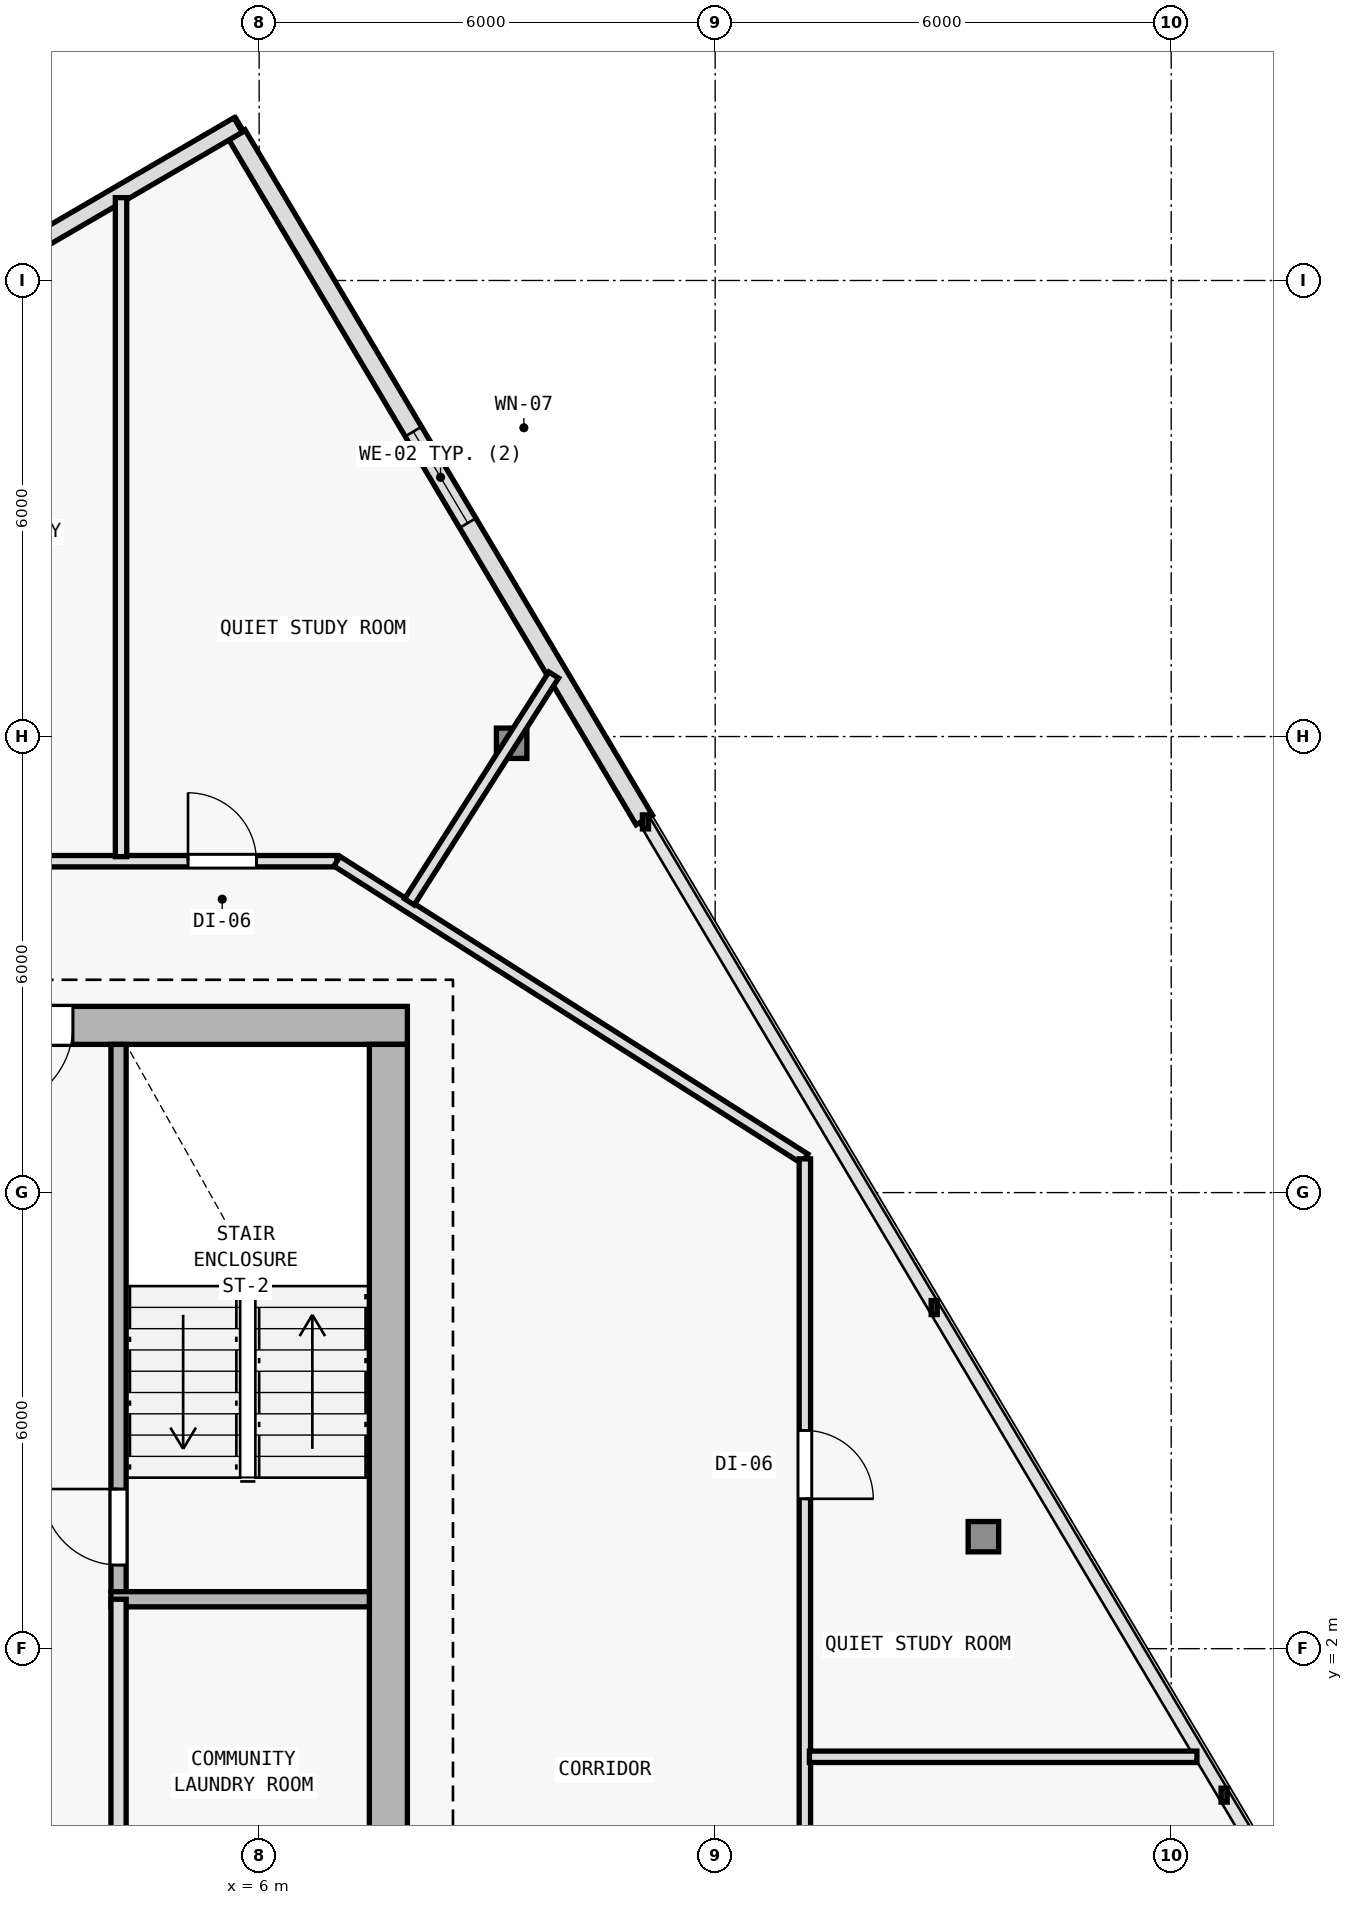
"""IFC4 building model, lengths in metres.
Left out: names, types, materials, properties, quantities, classifications, styles, units other than length and angle.
Written with IfcOpenShell. Run it as: python <this file> out.ifc"""

import sys

from ifc_helpers import new_model, si_unit, direction, frame, frame_2d, origin, origin_2d, place, context, subcontext, project, spatial, rectangle, i_section, extrude, element, fill, save


model = new_model("IFC4")
c1 = context("Model", 3, precision=1e-05, world=origin(), true_north=direction((0.0, 1.0)))
c2 = subcontext(c1, "Body", "Model", "MODEL_VIEW")
j1 = project(units=[si_unit("LENGTHUNIT", "METRE"), si_unit("PLANEANGLEUNIT", "RADIAN")], contexts=[c1])
p1 = place(None, origin())
s1 = spatial("IfcSite", under=j1, at=p1, CompositionType="ELEMENT")
p2 = place(p1, origin())
s2 = spatial("IfcBuilding", under=s1, at=p2, CompositionType="ELEMENT")
p3 = place(p2, frame((0.0, 0.0, 163.8)))
s3 = spatial("IfcBuildingStorey", under=s2, at=p3, CompositionType="ELEMENT", Elevation=163.8)
for number, where, z_axis, x_axis in (
    (1, (7.7, 10.2, 0.0), (0.0, 0.0, 1.0), (1.0, 0.0, 0.0)),
    (2, (7.7, 0.4, 0.0), (0.0, 0.0, 1.0), (1.0, 0.0, 0.0)),
):
    element("IfcColumn", number, at=place(p3, frame(where, z_axis=z_axis, x_axis=x_axis)), inside=s3, PredefinedType="COLUMN", context=c2, shape_type="SweptSolid", body=[
        extrude(i_section(OverallWidth=0.404, OverallDepth=0.407, WebThickness=0.017, FlangeThickness=0.028, FilletRadius=0.015, at=origin_2d()), origin(), (0.0, 0.0, 1.0), 3.6),
    ])
p4 = place(p3, frame((15.529, 3.473, 0.005), z_axis=(-0.018974023902, 0.009521015578, 0.999774642947), x_axis=(-0.44849454954, -0.893785566583, 0.0)))
e3 = element("IfcColumn", 3, at=p4, inside=s3, PredefinedType="COLUMN", context=c2, shape_type="SweptSolid", body=[
    extrude(i_section(OverallWidth=0.401, OverallDepth=0.399, WebThickness=0.016, FlangeThickness=0.025, FilletRadius=0.015, at=origin_2d()), origin(), (0.0, 0.0, 1.0), 3.59),
])
p5 = place(p3, frame((9.322, 13.912, 0.005), z_axis=(-0.011767054935, -0.002516653368, 0.999927598816), x_axis=(0.209143047003, -0.977885057607, 0.0)))
e4 = element("IfcColumn", 4, at=p5, inside=s3, PredefinedType="COLUMN", context=c2, shape_type="SweptSolid", body=[
    extrude(i_section(OverallWidth=0.401, OverallDepth=0.399, WebThickness=0.016, FlangeThickness=0.025, FilletRadius=0.015, at=origin_2d()), origin(), (0.0, 0.0, 1.0), 3.589),
])
p6 = place(p3, frame((5.706, 21.919, 0.0), z_axis=(0.0, 0.0, 1.0), x_axis=(0.511079110892, -0.859533677298, 0.0)))
e5 = element("IfcWall", 5, at=p6, inside=s3, PredefinedType="SOLIDWALL", context=c2, shape_type="SweptSolid", body=[
    extrude(rectangle(XDim=10.489, YDim=0.25, at=frame_2d((5.245, 0.0))), origin(), (0.0, 0.0, 1.0), 3.35),
])
p7 = place(p6, frame((4.545, 0.0, 0.62)))
e6 = element("IfcOpeningElement", 6, at=p7, cuts=e5, PredefinedType="OPENING", context=c2, shape_type="SweptSolid", body=[
    extrude(rectangle(XDim=1.4, YDim=2.0, at=frame_2d((0.7, 1.0))), frame((0.0, 0.135, 0.0), z_axis=(0.0, -1.0, 0.0), x_axis=(1.0, 0.0, 0.0)), (0.0, 0.0, 1.0), 0.27),
])
p8 = place(p3, frame((1.987, 19.868, 0.0), z_axis=(0.0, 0.0, 1.0), x_axis=(0.863979520686, 0.503526948469, 0.0)))
e7 = element("IfcWall", 7, at=p8, inside=s3, PredefinedType="SOLIDWALL", context=c2, shape_type="SweptSolid", body=[
    extrude(rectangle(XDim=4.324, YDim=0.22, at=frame_2d((2.162, 0.0))), origin(), (0.0, 0.0, 1.0), 3.35),
])
p9 = place(p3, frame((7.95, 10.2, 0.0), z_axis=(0.0, 0.0, 1.0), x_axis=(-1.0, 0.0, 0.0)))
e8 = element("IfcWall", 8, at=p9, inside=s3, PredefinedType="SHEAR", context=c2, shape_type="SweptSolid", body=[
    extrude(rectangle(XDim=15.9, YDim=0.5, at=frame_2d((7.95, 0.0))), origin(), (0.0, 0.0, 1.0), 3.35),
])
p10 = place(p9, frame((4.4, 0.0, 0.0)))
e9 = element("IfcOpeningElement", 9, at=p10, cuts=e8, PredefinedType="OPENING", context=c2, shape_type="SweptSolid", body=[
    extrude(rectangle(XDim=1.1, YDim=2.15, at=frame_2d((0.55, 1.075))), frame((0.0, 0.26, 0.0), z_axis=(0.0, -1.0, 0.0), x_axis=(1.0, 0.0, 0.0)), (0.0, 0.0, 1.0), 0.52),
])
p11 = place(p3, frame((7.7, 9.95, 0.0), z_axis=(0.0, 0.0, 1.0), x_axis=(0.0, -1.0, 0.0)))
e10 = element("IfcWall", 10, at=p11, inside=s3, PredefinedType="SHEAR", context=c2, shape_type="SweptSolid", body=[
    extrude(rectangle(XDim=19.1, YDim=0.5, at=frame_2d((9.55, 0.0))), origin(), (0.0, 0.0, 1.0), 3.35),
])
p12 = place(p3, frame((4.15, 2.75, 0.0), z_axis=(0.0, 0.0, 1.0), x_axis=(0.0, 1.0, 0.0)))
e11 = element("IfcWall", 11, at=p12, inside=s3, PredefinedType="SOLIDWALL", context=c2, shape_type="SweptSolid", body=[
    extrude(rectangle(XDim=7.2, YDim=0.2, at=frame_2d((3.6, 0.0))), origin(), (0.0, 0.0, 1.0), 3.35),
])
p13 = place(p12, frame((0.35, 0.0, 0.0)))
e12 = element("IfcOpeningElement", 12, at=p13, cuts=e11, PredefinedType="OPENING", context=c2, shape_type="SweptSolid", body=[
    extrude(rectangle(XDim=1.0, YDim=2.15, at=frame_2d((0.5, 1.075))), frame((0.0, 0.11, 0.0), z_axis=(0.0, -1.0, 0.0), x_axis=(1.0, 0.0, 0.0)), (0.0, 0.0, 1.0), 0.22),
])
p14 = place(p3, frame((4.05, 2.65, 0.0), z_axis=(0.0, 0.0, 1.0), x_axis=(1.0, 0.0, 0.0)))
e13 = element("IfcWall", 13, at=p14, inside=s3, PredefinedType="SOLIDWALL", context=c2, shape_type="SweptSolid", body=[
    extrude(rectangle(XDim=3.4, YDim=0.2, at=frame_2d((1.7, 0.0))), origin(), (0.0, 0.0, 1.0), 3.35),
])
p15 = place(p3, frame((4.15, -6.05, 0.0), z_axis=(0.0, 0.0, 1.0), x_axis=(0.0, 1.0, 0.0)))
e14 = element("IfcWall", 14, at=p15, inside=s3, PredefinedType="SOLIDWALL", context=c2, shape_type="SweptSolid", body=[
    extrude(rectangle(XDim=8.7, YDim=0.2, at=frame_2d((4.35, 0.0))), origin(), (0.0, 0.0, 1.0), 3.35),
])
p16 = place(p15, frame((3.6, 0.0, 0.0)))
e15 = element("IfcOpeningElement", 15, at=p16, cuts=e14, PredefinedType="OPENING", context=c2, shape_type="SweptSolid", body=[
    extrude(rectangle(XDim=0.95, YDim=2.1, at=frame_2d((0.475, 1.05))), frame((0.0, 0.11, 0.0), z_axis=(0.0, -1.0, 0.0), x_axis=(1.0, 0.0, 0.0)), (0.0, 0.0, 1.0), 0.22),
])
p17 = place(p3, frame((-7.041, 12.36, 0.0), z_axis=(0.0, 0.0, 1.0), x_axis=(1.0, 0.0, 0.0)))
e16 = element("IfcWall", 16, at=p17, inside=s3, PredefinedType="PARTITIONING", context=c2, shape_type="SweptSolid", body=[
    extrude(rectangle(XDim=14.064, YDim=0.15, at=frame_2d((7.032, 0.0))), origin(), (0.0, 0.0, 1.0), 2.965),
])
p18 = place(p17, frame((12.105, 0.0, 0.0)))
e17 = element("IfcOpeningElement", 17, at=p18, cuts=e16, PredefinedType="OPENING", context=c2, shape_type="SweptSolid", body=[
    extrude(rectangle(XDim=0.9, YDim=2.1, at=frame_2d((0.45, 1.05))), frame((0.0, 0.085, 0.0), z_axis=(0.0, -1.0, 0.0), x_axis=(1.0, 0.0, 0.0)), (0.0, 0.0, 1.0), 0.17),
])
p19 = place(p17, frame((9.137, 0.0, 0.0)))
e18 = element("IfcOpeningElement", 18, at=p19, cuts=e16, PredefinedType="OPENING", context=c2, shape_type="SweptSolid", body=[
    extrude(rectangle(XDim=0.9, YDim=2.1, at=frame_2d((0.45, 1.05))), frame((0.0, 0.085, 0.0), z_axis=(0.0, -1.0, 0.0), x_axis=(1.0, 0.0, 0.0)), (0.0, 0.0, 1.0), 0.17),
])
p20 = place(p17, frame((6.193, 0.0, 0.0)))
e19 = element("IfcOpeningElement", 19, at=p20, cuts=e16, PredefinedType="OPENING", context=c2, shape_type="SweptSolid", body=[
    extrude(rectangle(XDim=0.9, YDim=2.1, at=frame_2d((0.45, 1.05))), frame((0.0, 0.085, 0.0), z_axis=(0.0, -1.0, 0.0), x_axis=(1.0, 0.0, 0.0)), (0.0, 0.0, 1.0), 0.17),
])
p21 = place(p17, frame((2.337, 0.0, 0.0)))
e20 = element("IfcOpeningElement", 20, at=p21, cuts=e16, PredefinedType="OPENING", context=c2, shape_type="SweptSolid", body=[
    extrude(rectangle(XDim=0.9, YDim=2.1, at=frame_2d((0.45, 1.05))), frame((0.0, 0.085, 0.0), z_axis=(0.0, -1.0, 0.0), x_axis=(1.0, 0.0, 0.0)), (0.0, 0.0, 1.0), 0.17),
])
p22 = place(p3, frame((7.023, 12.36, 0.0), z_axis=(0.0, 0.0, 1.0), x_axis=(0.84376480085, -0.536713108511, 0.0)))
e21 = element("IfcWall", 21, at=p22, inside=s3, PredefinedType="PARTITIONING", context=c2, shape_type="SweptSolid", body=[
    extrude(rectangle(XDim=7.297, YDim=0.15, at=frame_2d((3.648, 0.0))), origin(), (0.0, 0.0, 1.0), 2.935),
])
p23 = place(p3, frame((13.18, 8.444, 0.0), z_axis=(0.0, 0.0, 1.0), x_axis=(0.0, -1.0, 0.0)))
e22 = element("IfcWall", 22, at=p23, inside=s3, PredefinedType="PARTITIONING", context=c2, shape_type="SweptSolid", body=[
    extrude(rectangle(XDim=20.004, YDim=0.15, at=frame_2d((10.002, 0.0))), origin(), (0.0, 0.0, 1.0), 2.825),
])
p24 = place(p23, frame((17.148, 0.0, 0.0)))
e23 = element("IfcOpeningElement", 23, at=p24, cuts=e22, PredefinedType="OPENING", context=c2, shape_type="SweptSolid", body=[
    extrude(rectangle(XDim=0.9, YDim=2.1, at=frame_2d((0.45, 1.05))), frame((0.0, 0.085, 0.0), z_axis=(0.0, -1.0, 0.0), x_axis=(1.0, 0.0, 0.0)), (0.0, 0.0, 1.0), 0.17),
])
p25 = place(p23, frame((11.168, 0.0, 0.0)))
e24 = element("IfcOpeningElement", 24, at=p25, cuts=e22, PredefinedType="OPENING", context=c2, shape_type="SweptSolid", body=[
    extrude(rectangle(XDim=0.9, YDim=2.1, at=frame_2d((0.45, 1.05))), frame((0.0, 0.085, 0.0), z_axis=(0.0, -1.0, 0.0), x_axis=(1.0, 0.0, 0.0)), (0.0, 0.0, 1.0), 0.17),
])
p26 = place(p23, frame((3.573, 0.0, 0.0)))
e25 = element("IfcOpeningElement", 25, at=p26, cuts=e22, PredefinedType="OPENING", context=c2, shape_type="SweptSolid", body=[
    extrude(rectangle(XDim=0.9, YDim=2.1, at=frame_2d((0.45, 1.05))), frame((0.0, 0.085, 0.0), z_axis=(0.0, -1.0, 0.0), x_axis=(1.0, 0.0, 0.0)), (0.0, 0.0, 1.0), 0.17),
])
p27 = place(p3, frame((7.977, 11.825, 0.0), z_axis=(0.0, 0.0, 1.0), x_axis=(0.536687935095, 0.843780812962, 0.0)))
e26 = element("IfcWall", 26, at=p27, inside=s3, PredefinedType="PARTITIONING", context=c2, shape_type="SweptSolid", body=[
    extrude(rectangle(XDim=3.538, YDim=0.15, at=frame_2d((1.769, 0.0))), origin(), (0.0, 0.0, 1.0), 2.935),
])
p28 = place(p3, frame((13.24, 0.577, 0.0), z_axis=(0.0, 0.0, 1.0), x_axis=(1.0, 0.0, 0.0)))
e27 = element("IfcWall", 27, at=p28, inside=s3, PredefinedType="PARTITIONING", context=c2, shape_type="SweptSolid", body=[
    extrude(rectangle(XDim=5.098, YDim=0.15, at=frame_2d((2.549, 0.0))), origin(), (0.0, 0.0, 1.0), 2.925),
])
p29 = place(p3, frame((4.183, 12.42, 0.0), z_axis=(0.0, 0.0, 1.0), x_axis=(0.0, 1.0, 0.0)))
e28 = element("IfcWall", 28, at=p29, inside=s3, PredefinedType="PARTITIONING", context=c2, shape_type="SweptSolid", body=[
    extrude(rectangle(XDim=8.67, YDim=0.15, at=frame_2d((4.335, 0.0))), origin(), (0.0, 0.0, 1.0), 2.935),
])
p30 = place(p7, origin())
e29 = element("IfcWindow", 29, at=p30, inside=s3, PartitioningType="SINGLE_PANEL", PredefinedType="WINDOW", context=c2, shape_type="SweptSolid", body=[
    extrude(rectangle(XDim=1.4, YDim=2.0, at=frame_2d((0.7, 1.0))), frame((0.0, 0.03, 0.0), z_axis=(0.0, -1.0, 0.0), x_axis=(1.0, 0.0, 0.0)), (0.0, 0.0, 1.0), 0.06),
])
fill(e6, e29)
p31 = place(p10, origin())
e30 = element("IfcDoor", 30, at=p31, inside=s3, OperationType="SINGLE_SWING_RIGHT", PredefinedType="DOOR", context=c2, shape_type="SweptSolid", body=[
    extrude(rectangle(XDim=1.1, YDim=2.15, at=frame_2d((0.55, 1.075))), frame((0.0, 0.025, 0.0), z_axis=(0.0, -1.0, 0.0), x_axis=(1.0, 0.0, 0.0)), (0.0, 0.0, 1.0), 0.05),
])
fill(e9, e30)
p32 = place(p13, origin())
e31 = element("IfcDoor", 31, at=p32, inside=s3, OperationType="SINGLE_SWING_RIGHT", PredefinedType="DOOR", context=c2, shape_type="SweptSolid", body=[
    extrude(rectangle(XDim=1.0, YDim=2.15, at=frame_2d((0.5, 1.075))), frame((0.0, 0.025, 0.0), z_axis=(0.0, -1.0, 0.0), x_axis=(1.0, 0.0, 0.0)), (0.0, 0.0, 1.0), 0.05),
])
fill(e12, e31)
p33 = place(p26, origin())
e32 = element("IfcDoor", 32, at=p33, inside=s3, OperationType="SINGLE_SWING_RIGHT", PredefinedType="DOOR", context=c2, shape_type="SweptSolid", body=[
    extrude(rectangle(XDim=0.9, YDim=2.1, at=frame_2d((0.45, 1.05))), frame((0.0, 0.025, 0.0), z_axis=(0.0, -1.0, 0.0), x_axis=(1.0, 0.0, 0.0)), (0.0, 0.0, 1.0), 0.05),
])
fill(e25, e32)
p34 = place(p18, origin())
e33 = element("IfcDoor", 33, at=p34, inside=s3, OperationType="SINGLE_SWING_LEFT", PredefinedType="DOOR", context=c2, shape_type="SweptSolid", body=[
    extrude(rectangle(XDim=0.9, YDim=2.1, at=frame_2d((0.45, 1.05))), frame((0.0, 0.025, 0.0), z_axis=(0.0, -1.0, 0.0), x_axis=(1.0, 0.0, 0.0)), (0.0, 0.0, 1.0), 0.05),
])
fill(e17, e33)
save(model, sys.argv[1])
